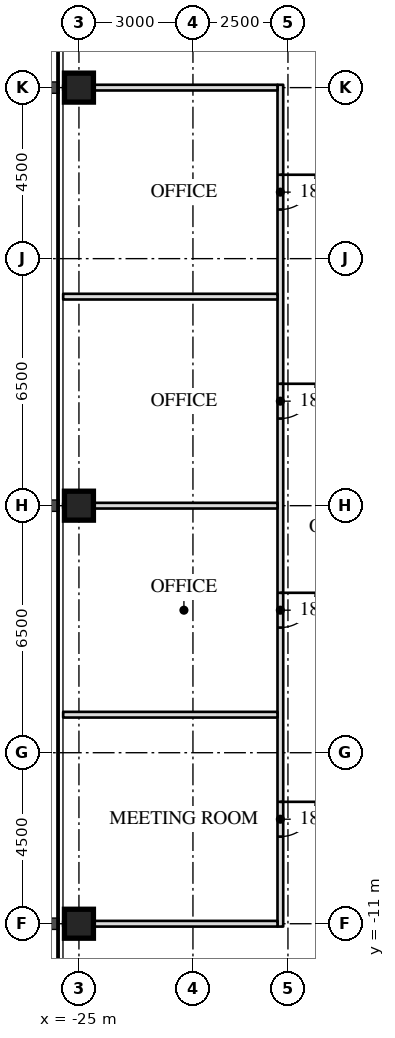
"""IFC4 building model, lengths in metres.
Left out: names, types, materials, properties, quantities, classifications, styles, units other than length and angle.
Written with IfcOpenShell. Run it as: python <this file> out.ifc"""

import sys

from ifc_helpers import new_model, si_unit, direction, frame, frame_2d, origin, origin_2d, place, context, subcontext, project, spatial, rectangle, hollow_rectangle, extrude, element, fill, save


model = new_model("IFC4")
c1 = context("Model", 3, precision=1e-05, world=origin(), true_north=direction((0.0, 1.0)))
c2 = subcontext(c1, "Body", "Model", "MODEL_VIEW")
j1 = project(units=[si_unit("LENGTHUNIT", "METRE"), si_unit("PLANEANGLEUNIT", "RADIAN")], contexts=[c1])
p1 = place(None, origin())
s1 = spatial("IfcSite", under=j1, at=p1, CompositionType="ELEMENT")
p2 = place(p1, origin())
s2 = spatial("IfcBuilding", under=s1, at=p2, CompositionType="ELEMENT")
p3 = place(p2, frame((0.0, 0.0, 77.5)))
s3 = spatial("IfcBuildingStorey", under=s2, at=p3, CompositionType="ELEMENT", Elevation=77.5)
for number, where, z_axis, x_axis in (
    (1, (-25.0, 0.0, 0.0), (0.0, 0.0, 1.0), (0.0, 1.0, 0.0)),
    (2, (-25.0, -11.0, 0.0), (0.0, 0.0, 1.0), (0.0, 1.0, 0.0)),
    (3, (-25.0, 11.0, 0.0), (0.0, 0.0, 1.0), (0.0, 1.0, 0.0)),
):
    element("IfcColumn", number, at=place(p3, frame(where, z_axis=z_axis, x_axis=x_axis)), inside=s3, PredefinedType="COLUMN", context=c2, shape_type="SweptSolid", body=[
        extrude(hollow_rectangle(XDim=0.762, YDim=0.762, WallThickness=0.127, at=origin_2d()), origin(), (0.0, 0.0, 1.0), 4.1),
    ])
p4 = place(p3, frame((-19.7, 11.075, 0.0), z_axis=(0.0, 0.0, 1.0), x_axis=(0.0, -1.0, 0.0)))
e4 = element("IfcWall", 4, at=p4, inside=s3, PredefinedType="PARTITIONING", context=c2, shape_type="SweptSolid", body=[
    extrude(rectangle(XDim=22.15, YDim=0.15, at=frame_2d((11.075, 0.0))), origin(), (0.0, 0.0, 1.0), 3.91),
])
p5 = place(p4, frame((2.367, 0.0, 0.0)))
e5 = element("IfcOpeningElement", 5, at=p5, cuts=e4, PredefinedType="OPENING", context=c2, shape_type="SweptSolid", body=[
    extrude(rectangle(XDim=0.915, YDim=2.134, at=frame_2d((0.458, 1.067))), frame((0.0, 0.085, 0.0), z_axis=(0.0, -1.0, 0.0), x_axis=(1.0, 0.0, 0.0)), (0.0, 0.0, 1.0), 0.17),
])
p6 = place(p4, frame((7.867, 0.0, 0.0)))
e6 = element("IfcOpeningElement", 6, at=p6, cuts=e4, PredefinedType="OPENING", context=c2, shape_type="SweptSolid", body=[
    extrude(rectangle(XDim=0.915, YDim=2.134, at=frame_2d((0.458, 1.067))), frame((0.0, 0.085, 0.0), z_axis=(0.0, -1.0, 0.0), x_axis=(1.0, 0.0, 0.0)), (0.0, 0.0, 1.0), 0.17),
])
p7 = place(p4, frame((13.367, 0.0, 0.0)))
e7 = element("IfcOpeningElement", 7, at=p7, cuts=e4, PredefinedType="OPENING", context=c2, shape_type="SweptSolid", body=[
    extrude(rectangle(XDim=0.915, YDim=2.134, at=frame_2d((0.458, 1.067))), frame((0.0, 0.085, 0.0), z_axis=(0.0, -1.0, 0.0), x_axis=(1.0, 0.0, 0.0)), (0.0, 0.0, 1.0), 0.17),
])
p8 = place(p4, frame((18.867, 0.0, 0.0)))
e8 = element("IfcOpeningElement", 8, at=p8, cuts=e4, PredefinedType="OPENING", context=c2, shape_type="SweptSolid", body=[
    extrude(rectangle(XDim=0.915, YDim=2.134, at=frame_2d((0.458, 1.067))), frame((0.0, 0.085, 0.0), z_axis=(0.0, -1.0, 0.0), x_axis=(1.0, 0.0, 0.0)), (0.0, 0.0, 1.0), 0.17),
])
p9 = place(p3, frame((-19.775, 11.0, 0.0), z_axis=(0.0, 0.0, 1.0), x_axis=(-1.0, 0.0, 0.0)))
e9 = element("IfcWall", 9, at=p9, inside=s3, PredefinedType="PARTITIONING", context=c2, shape_type="SweptSolid", body=[
    extrude(rectangle(XDim=5.64, YDim=0.15, at=frame_2d((2.82, 0.0))), origin(), (0.0, 0.0, 1.0), 3.13),
])
p10 = place(p3, frame((-19.775, 5.5, 0.0), z_axis=(0.0, 0.0, 1.0), x_axis=(-1.0, 0.0, 0.0)))
e10 = element("IfcWall", 10, at=p10, inside=s3, PredefinedType="PARTITIONING", context=c2, shape_type="SweptSolid", body=[
    extrude(rectangle(XDim=5.64, YDim=0.15, at=frame_2d((2.82, 0.0))), origin(), (0.0, 0.0, 1.0), 3.91),
])
p11 = place(p3, frame((-19.775, 0.0, 0.0), z_axis=(0.0, 0.0, 1.0), x_axis=(-1.0, 0.0, 0.0)))
e11 = element("IfcWall", 11, at=p11, inside=s3, PredefinedType="PARTITIONING", context=c2, shape_type="SweptSolid", body=[
    extrude(rectangle(XDim=5.64, YDim=0.15, at=frame_2d((2.82, 0.0))), origin(), (0.0, 0.0, 1.0), 3.13),
])
p12 = place(p3, frame((-19.775, -5.5, 0.0), z_axis=(0.0, 0.0, 1.0), x_axis=(-1.0, 0.0, 0.0)))
e12 = element("IfcWall", 12, at=p12, inside=s3, PredefinedType="PARTITIONING", context=c2, shape_type="SweptSolid", body=[
    extrude(rectangle(XDim=5.64, YDim=0.15, at=frame_2d((2.82, 0.0))), origin(), (0.0, 0.0, 1.0), 3.91),
])
p13 = place(p3, frame((-19.775, -11.0, 0.0), z_axis=(0.0, 0.0, 1.0), x_axis=(-1.0, 0.0, 0.0)))
e13 = element("IfcWall", 13, at=p13, inside=s3, PredefinedType="PARTITIONING", context=c2, shape_type="SweptSolid", body=[
    extrude(rectangle(XDim=5.64, YDim=0.15, at=frame_2d((2.82, 0.0))), origin(), (0.0, 0.0, 1.0), 3.13),
])
p14 = place(p5, origin())
e14 = element("IfcDoor", 14, at=p14, inside=s3, OperationType="SINGLE_SWING_LEFT", PredefinedType="DOOR", context=c2, shape_type="SweptSolid", body=[
    extrude(rectangle(XDim=0.915, YDim=2.134, at=frame_2d((0.458, 1.067))), frame((0.0, 0.025, 0.0), z_axis=(0.0, -1.0, 0.0), x_axis=(1.0, 0.0, 0.0)), (0.0, 0.0, 1.0), 0.05),
])
fill(e5, e14)
p15 = place(p6, origin())
e15 = element("IfcDoor", 15, at=p15, inside=s3, OperationType="SINGLE_SWING_LEFT", PredefinedType="DOOR", context=c2, shape_type="SweptSolid", body=[
    extrude(rectangle(XDim=0.915, YDim=2.134, at=frame_2d((0.458, 1.067))), frame((0.0, 0.025, 0.0), z_axis=(0.0, -1.0, 0.0), x_axis=(1.0, 0.0, 0.0)), (0.0, 0.0, 1.0), 0.05),
])
fill(e6, e15)
p16 = place(p7, origin())
e16 = element("IfcDoor", 16, at=p16, inside=s3, OperationType="SINGLE_SWING_LEFT", PredefinedType="DOOR", context=c2, shape_type="SweptSolid", body=[
    extrude(rectangle(XDim=0.915, YDim=2.134, at=frame_2d((0.458, 1.067))), frame((0.0, 0.025, 0.0), z_axis=(0.0, -1.0, 0.0), x_axis=(1.0, 0.0, 0.0)), (0.0, 0.0, 1.0), 0.05),
])
fill(e7, e16)
p17 = place(p8, origin())
e17 = element("IfcDoor", 17, at=p17, inside=s3, OperationType="SINGLE_SWING_LEFT", PredefinedType="DOOR", context=c2, shape_type="SweptSolid", body=[
    extrude(rectangle(XDim=0.915, YDim=2.134, at=frame_2d((0.458, 1.067))), frame((0.0, 0.025, 0.0), z_axis=(0.0, -1.0, 0.0), x_axis=(1.0, 0.0, 0.0)), (0.0, 0.0, 1.0), 0.05),
])
fill(e8, e17)
save(model, sys.argv[1])
